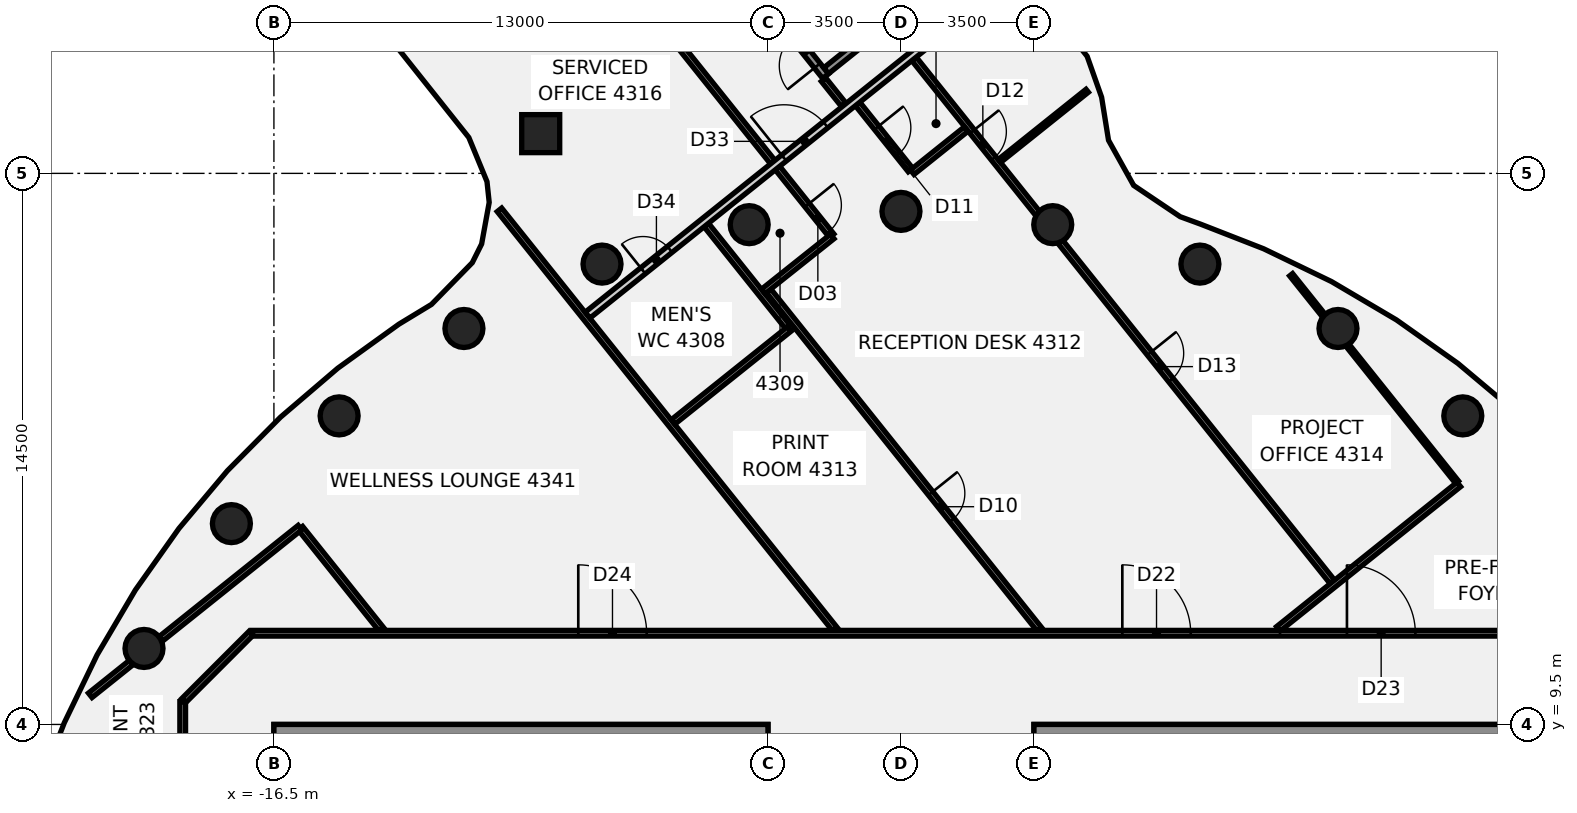
"""IFC4 building model, lengths in metres.
Left out: names, types, materials, properties, quantities, classifications, styles, units other than length and angle.
Written with IfcOpenShell. Run it as: python <this file> out.ifc"""

import sys

from ifc_helpers import new_model, si_unit, direction, frame, frame_2d, origin, origin_2d, place, context, subcontext, project, spatial, rectangle, circle, extrude, element, fill, save


model = new_model("IFC4")
c1 = context("Model", 3, precision=1e-05, world=origin(), true_north=direction((0.0, 1.0)))
c2 = subcontext(c1, "Body", "Model", "MODEL_VIEW")
j1 = project(units=[si_unit("LENGTHUNIT", "METRE"), si_unit("PLANEANGLEUNIT", "RADIAN")], contexts=[c1])
p1 = place(None, origin())
s1 = spatial("IfcSite", under=j1, at=p1, CompositionType="ELEMENT")
p2 = place(p1, origin())
s2 = spatial("IfcBuilding", under=s1, at=p2, CompositionType="ELEMENT")
p3 = place(p2, frame((0.0, 0.0, 174.25)))
s3 = spatial("IfcBuildingStorey", under=s2, at=p3, CompositionType="ELEMENT", Elevation=174.25)
for number, where, z_axis, x_axis in (
    (1, (14.784, 17.619, -0.14), (0.0, 0.0, 1.0), (1.0, 0.0, 0.0)),
    (2, (11.5, 19.919, -0.14), (0.0, 0.0, 1.0), (1.0, 0.0, 0.0)),
    (3, (7.866, 21.613, -0.14), (0.0, 0.0, 1.0), (1.0, 0.0, 0.0)),
    (4, (3.994, 22.651, -0.14), (0.0, 0.0, 1.0), (1.0, 0.0, 0.0)),
    (5, (0.0, 23.0, -0.14), (0.0, 0.0, 1.0), (1.0, 0.0, 0.0)),
    (6, (-3.994, 22.651, -0.14), (0.0, 0.0, 1.0), (1.0, 0.0, 0.0)),
    (7, (-7.866, 21.613, -0.14), (0.0, 0.0, 1.0), (1.0, 0.0, 0.0)),
    (8, (-11.5, 19.919, -0.14), (0.0, 0.0, 1.0), (1.0, 0.0, 0.0)),
    (9, (-14.784, 17.619, -0.14), (0.0, 0.0, 1.0), (1.0, 0.0, 0.0)),
    (10, (-17.619, 14.784, -0.14), (0.0, 0.0, 1.0), (1.0, 0.0, 0.0)),
    (11, (-19.919, 11.5, -0.14), (0.0, 0.0, 1.0), (1.0, 0.0, 0.0)),
):
    element("IfcColumn", number, at=place(p3, frame(where, z_axis=z_axis, x_axis=x_axis)), inside=s3, PredefinedType="COLUMN", context=c2, shape_type="SweptSolid", body=[
        extrude(circle(Radius=0.5, at=origin_2d()), origin(), (0.0, 0.0, 1.0), 3.71),
    ])
p4 = place(p3, frame((-9.48, 25.046, -0.139), z_axis=(-0.014481164996, -0.046668845375, 0.998805443884), x_axis=(0.780047471785, 0.624409257926, 0.040484816638)))
e12 = element("IfcColumn", 12, at=p4, inside=s3, PredefinedType="COLUMN", context=c2, shape_type="SweptSolid", body=[
    extrude(rectangle(XDim=1.0, YDim=1.0, at=origin_2d()), origin(), (0.0, 0.0, 1.0), 3.709),
])
p5 = place(p3, frame((-15.802, 14.664, 0.0), z_axis=(0.0, 0.0, 1.0), x_axis=(0.624703791161, -0.780861814477, 0.0)))
e13 = element("IfcWall", 13, at=p5, inside=s3, PredefinedType="PARTITIONING", context=c2, shape_type="SweptSolid", body=[
    extrude(rectangle(XDim=3.405, YDim=0.15, at=frame_2d((1.703, 0.0))), origin(), (0.0, 0.0, 1.0), 2.97),
])
p6 = place(p3, frame((-14.505, 38.211, 0.0), z_axis=(0.0, 0.0, 1.0), x_axis=(0.624664246516, -0.780893449278, 0.0)))
e14 = element("IfcWall", 14, at=p6, inside=s3, PredefinedType="PARTITIONING", context=c2, shape_type="SweptSolid", body=[
    extrude(rectangle(XDim=20.3, YDim=0.15, at=frame_2d((10.15, 0.0))), origin(), (0.0, 0.0, 1.0), 2.87),
])
p7 = place(p6, frame((19.27, 0.0, 0.0)))
e15 = element("IfcOpeningElement", 15, at=p7, cuts=e14, PredefinedType="OPENING", context=c2, shape_type="SweptSolid", body=[
    extrude(rectangle(XDim=0.9, YDim=2.1, at=frame_2d((0.45, 1.05))), frame((0.0, 0.085, 0.0), z_axis=(0.0, -1.0, 0.0), x_axis=(1.0, 0.0, 0.0)), (0.0, 0.0, 1.0), 0.17),
])
p8 = place(p6, frame((8.77, 0.0, 0.0)))
e16 = element("IfcOpeningElement", 16, at=p8, cuts=e14, PredefinedType="OPENING", context=c2, shape_type="SweptSolid", body=[
    extrude(rectangle(XDim=0.9, YDim=2.1, at=frame_2d((0.45, 1.05))), frame((0.0, 0.085, 0.0), z_axis=(0.0, -1.0, 0.0), x_axis=(1.0, 0.0, 0.0)), (0.0, 0.0, 1.0), 0.17),
])
p9 = place(p6, frame((2.32, 0.0, 0.0)))
e17 = element("IfcOpeningElement", 17, at=p9, cuts=e14, PredefinedType="OPENING", context=c2, shape_type="SweptSolid", body=[
    extrude(rectangle(XDim=0.9, YDim=2.1, at=frame_2d((0.45, 1.05))), frame((0.0, 0.085, 0.0), z_axis=(0.0, -1.0, 0.0), x_axis=(1.0, 0.0, 0.0)), (0.0, 0.0, 1.0), 0.17),
])
p10 = place(p3, frame((-2.037, 26.467, 0.0), z_axis=(0.0, 0.0, 1.0), x_axis=(0.624730499049, -0.780840446927, 0.0)))
e18 = element("IfcWall", 18, at=p10, inside=s3, PredefinedType="PARTITIONING", context=c2, shape_type="SweptSolid", body=[
    extrude(rectangle(XDim=0.84, YDim=0.15, at=frame_2d((0.42, 0.0))), origin(), (0.0, 0.0, 1.0), 2.87),
])
p11 = place(p3, frame((-10.565, 23.041, 0.0), z_axis=(0.0, 0.0, 1.0), x_axis=(0.624676086113, -0.780883978218, 0.0)))
e19 = element("IfcWall", 19, at=p11, inside=s3, PredefinedType="PARTITIONING", context=c2, shape_type="SweptSolid", body=[
    extrude(rectangle(XDim=14.132, YDim=0.15, at=frame_2d((7.066, 0.0))), origin(), (0.0, 0.0, 1.0), 2.97),
])
p12 = place(p3, frame((-5.123, 22.641, 0.0), z_axis=(0.0, 0.0, 1.0), x_axis=(0.624590747683, -0.780952237918, 0.0)))
e20 = element("IfcWall", 20, at=p12, inside=s3, PredefinedType="PARTITIONING", context=c2, shape_type="SweptSolid", body=[
    extrude(rectangle(XDim=3.426, YDim=0.15, at=frame_2d((1.713, 0.0))), origin(), (0.0, 0.0, 1.0), 2.87),
])
p13 = place(p3, frame((-3.479, 20.906, 0.0), z_axis=(0.0, 0.0, 1.0), x_axis=(0.624627130609, -0.780923138155, 0.0)))
e21 = element("IfcWall", 21, at=p13, inside=s3, PredefinedType="PARTITIONING", context=c2, shape_type="SweptSolid", body=[
    extrude(rectangle(XDim=11.398, YDim=0.15, at=frame_2d((5.699, 0.0))), origin(), (0.0, 0.0, 1.0), 2.97),
])
p14 = place(p13, frame((6.82, 0.0, 0.0)))
e22 = element("IfcOpeningElement", 22, at=p14, cuts=e21, PredefinedType="OPENING", context=c2, shape_type="SweptSolid", body=[
    extrude(rectangle(XDim=0.9, YDim=2.1, at=frame_2d((0.45, 1.05))), frame((0.0, 0.085, 0.0), z_axis=(0.0, -1.0, 0.0), x_axis=(1.0, 0.0, 0.0)), (0.0, 0.0, 1.0), 0.17),
])
p15 = place(p3, frame((-1.139, 25.826, 0.0), z_axis=(0.0, 0.0, 1.0), x_axis=(0.624641514256, -0.780911633072, 0.0)))
e23 = element("IfcWall", 23, at=p15, inside=s3, PredefinedType="PARTITIONING", context=c2, shape_type="SweptSolid", body=[
    extrude(rectangle(XDim=2.225, YDim=0.15, at=frame_2d((1.112, 0.0))), origin(), (0.0, 0.0, 1.0), 2.97),
])
p16 = place(p15, frame((0.8, 0.0, 0.0)))
e24 = element("IfcOpeningElement", 24, at=p16, cuts=e23, PredefinedType="OPENING", context=c2, shape_type="SweptSolid", body=[
    extrude(rectangle(XDim=0.9, YDim=2.1, at=frame_2d((0.45, 1.05))), frame((0.0, 0.085, 0.0), z_axis=(0.0, -1.0, 0.0), x_axis=(1.0, 0.0, 0.0)), (0.0, 0.0, 1.0), 0.17),
])
p17 = place(p3, frame((0.344, 27.013, 0.0), z_axis=(0.0, 0.0, 1.0), x_axis=(0.624651442113, -0.7809036918, 0.0)))
e25 = element("IfcWall", 25, at=p17, inside=s3, PredefinedType="PARTITIONING", context=c2, shape_type="SweptSolid", body=[
    extrude(rectangle(XDim=5.462, YDim=0.15, at=frame_2d((2.731, 0.0))), origin(), (0.0, 0.0, 1.0), 2.97),
])
p18 = place(p17, frame((2.45, 0.0, 0.0)))
e26 = element("IfcOpeningElement", 26, at=p18, cuts=e25, PredefinedType="OPENING", context=c2, shape_type="SweptSolid", body=[
    extrude(rectangle(XDim=0.9, YDim=2.1, at=frame_2d((0.45, 1.05))), frame((0.0, 0.085, 0.0), z_axis=(0.0, -1.0, 0.0), x_axis=(1.0, 0.0, 0.0)), (0.0, 0.0, 1.0), 0.17),
])
p19 = place(p3, frame((4.037, 22.396, 0.0), z_axis=(0.0, 0.0, 1.0), x_axis=(0.624628926241, -0.780921701903, 0.0)))
e27 = element("IfcWall", 27, at=p19, inside=s3, PredefinedType="PARTITIONING", context=c2, shape_type="SweptSolid", body=[
    extrude(rectangle(XDim=11.708, YDim=0.15, at=frame_2d((5.854, 0.0))), origin(), (0.0, 0.0, 1.0), 2.97),
])
p20 = place(p19, frame((4.007, 0.0, 0.0)))
e28 = element("IfcOpeningElement", 28, at=p20, cuts=e27, PredefinedType="OPENING", context=c2, shape_type="SweptSolid", body=[
    extrude(rectangle(XDim=0.9, YDim=2.1, at=frame_2d((0.45, 1.05))), frame((0.0, 0.085, 0.0), z_axis=(0.0, -1.0, 0.0), x_axis=(1.0, 0.0, 0.0)), (0.0, 0.0, 1.0), 0.17),
])
p21 = place(p3, frame((10.266, 21.333, 0.0), z_axis=(0.0, 0.0, 1.0), x_axis=(0.62463072699, -0.780920261551, 0.0)))
e29 = element("IfcWall", 29, at=p21, inside=s3, PredefinedType="PARTITIONING", context=c2, shape_type="SweptSolid", body=[
    extrude(rectangle(XDim=1.389, YDim=0.1, at=frame_2d((0.694, 0.0))), origin(), (0.0, 0.0, 1.0), 2.97),
])
p22 = place(p3, frame((11.752, 19.476, 0.0), z_axis=(0.0, 0.0, 1.0), x_axis=(0.624636960835, -0.780915275276, 0.0)))
e30 = element("IfcWall", 30, at=p22, inside=s3, PredefinedType="PARTITIONING", context=c2, shape_type="SweptSolid", body=[
    extrude(rectangle(XDim=4.613, YDim=0.1, at=frame_2d((2.307, 0.0))), origin(), (0.0, 0.0, 1.0), 2.97),
])
p23 = place(p3, frame((-17.065, 11.9, 0.0), z_axis=(0.0, 0.0, 1.0), x_axis=(1.0, 0.0, 0.0)))
e31 = element("IfcWall", 31, at=p23, inside=s3, PredefinedType="PARTITIONING", context=c2, shape_type="SweptSolid", body=[
    extrude(rectangle(XDim=34.165, YDim=0.15, at=frame_2d((17.083, 0.0))), origin(), (0.0, 0.0, 1.0), 2.97),
])
p24 = place(p23, frame((22.89, 0.0, 0.0)))
e32 = element("IfcOpeningElement", 32, at=p24, cuts=e31, PredefinedType="OPENING", context=c2, shape_type="SweptSolid", body=[
    extrude(rectangle(XDim=1.8, YDim=2.1, at=frame_2d((0.9, 1.05))), frame((0.0, 0.085, 0.0), z_axis=(0.0, -1.0, 0.0), x_axis=(1.0, 0.0, 0.0)), (0.0, 0.0, 1.0), 0.17),
])
p25 = place(p23, frame((28.801, 0.0, 0.0)))
e33 = element("IfcOpeningElement", 33, at=p25, cuts=e31, PredefinedType="OPENING", context=c2, shape_type="SweptSolid", body=[
    extrude(rectangle(XDim=1.8, YDim=2.1, at=frame_2d((0.9, 1.05))), frame((0.0, 0.085, 0.0), z_axis=(0.0, -1.0, 0.0), x_axis=(1.0, 0.0, 0.0)), (0.0, 0.0, 1.0), 0.17),
])
p26 = place(p23, frame((8.574, 0.0, 0.0)))
e34 = element("IfcOpeningElement", 34, at=p26, cuts=e31, PredefinedType="OPENING", context=c2, shape_type="SweptSolid", body=[
    extrude(rectangle(XDim=1.8, YDim=2.1, at=frame_2d((0.9, 1.05))), frame((0.0, 0.085, 0.0), z_axis=(0.0, -1.0, 0.0), x_axis=(1.0, 0.0, 0.0)), (0.0, 0.0, 1.0), 0.17),
])
p27 = place(p3, frame((-21.333, 10.266, 0.0), z_axis=(0.0, 0.0, 1.0), x_axis=(0.780920261551, 0.62463072699, 0.0)))
e35 = element("IfcWall", 35, at=p27, inside=s3, PredefinedType="PARTITIONING", context=c2, shape_type="SweptSolid", body=[
    extrude(rectangle(XDim=1.389, YDim=0.15, at=frame_2d((0.694, 0.0))), origin(), (0.0, 0.0, 1.0), 2.97),
])
p28 = place(p3, frame((-19.476, 11.752, 0.0), z_axis=(0.0, 0.0, 1.0), x_axis=(0.780939933327, 0.624606132323, 0.0)))
e36 = element("IfcWall", 36, at=p28, inside=s3, PredefinedType="PARTITIONING", context=c2, shape_type="SweptSolid", body=[
    extrude(rectangle(XDim=4.688, YDim=0.15, at=frame_2d((2.344, 0.0))), origin(), (0.0, 0.0, 1.0), 2.97),
])
p29 = place(p3, frame((-8.247, 20.27, 0.0), z_axis=(0.0, 0.0, 1.0), x_axis=(0.780898959687, 0.624657357885, 0.0)))
e37 = element("IfcWall", 37, at=p29, inside=s3, PredefinedType="PARTITIONING", context=c2, shape_type="SweptSolid", body=[
    extrude(rectangle(XDim=14.219, YDim=0.2, at=frame_2d((7.11, 0.0))), origin(), (0.0, 0.0, 1.0), 2.87),
])
p30 = place(p29, frame((6.62, 0.0, 0.0)))
e38 = element("IfcOpeningElement", 38, at=p30, cuts=e37, PredefinedType="OPENING", context=c2, shape_type="SweptSolid", body=[
    extrude(rectangle(XDim=1.4, YDim=2.1, at=frame_2d((0.7, 1.05))), frame((0.0, 0.11, 0.0), z_axis=(0.0, -1.0, 0.0), x_axis=(1.0, 0.0, 0.0)), (0.0, 0.0, 1.0), 0.22),
])
p31 = place(p29, frame((1.87, 0.0, 0.0)))
e39 = element("IfcOpeningElement", 39, at=p31, cuts=e37, PredefinedType="OPENING", context=c2, shape_type="SweptSolid", body=[
    extrude(rectangle(XDim=0.9, YDim=2.1, at=frame_2d((0.45, 1.05))), frame((0.0, 0.11, 0.0), z_axis=(0.0, -1.0, 0.0), x_axis=(1.0, 0.0, 0.0)), (0.0, 0.0, 1.0), 0.22),
])
p32 = place(p3, frame((-5.998, 17.459, 0.0), z_axis=(0.0, 0.0, 1.0), x_axis=(0.781020694531, 0.624505143865, 0.0)))
e40 = element("IfcWall", 40, at=p32, inside=s3, PredefinedType="PARTITIONING", context=c2, shape_type="SweptSolid", body=[
    extrude(rectangle(XDim=3.92, YDim=0.15, at=frame_2d((1.96, 0.0))), origin(), (0.0, 0.0, 1.0), 2.97),
])
p33 = place(p3, frame((2.59, 24.325, 0.0), z_axis=(0.0, 0.0, 1.0), x_axis=(0.781045836703, 0.624473699181, 0.0)))
e41 = element("IfcWall", 41, at=p33, inside=s3, PredefinedType="PARTITIONING", context=c2, shape_type="SweptSolid", body=[
    extrude(rectangle(XDim=2.959, YDim=0.1, at=frame_2d((1.48, 0.0))), origin(), (0.0, 0.0, 1.0), 2.97),
])
p34 = place(p3, frame((-3.623, 20.894, 0.0), z_axis=(0.0, 0.0, 1.0), x_axis=(0.782303881758, 0.622896971084, 0.0)))
e42 = element("IfcWall", 42, at=p34, inside=s3, PredefinedType="PARTITIONING", context=c2, shape_type="SweptSolid", body=[
    extrude(rectangle(XDim=2.32, YDim=0.15, at=frame_2d((1.16, 0.0))), origin(), (0.0, 0.0, 1.0), 2.87),
])
p35 = place(p3, frame((0.297, 24.03, 0.0), z_axis=(0.0, 0.0, 1.0), x_axis=(0.780698592374, 0.624907759485, 0.0)))
e43 = element("IfcWall", 43, at=p35, inside=s3, PredefinedType="PARTITIONING", context=c2, shape_type="SweptSolid", body=[
    extrude(rectangle(XDim=1.819, YDim=0.15, at=frame_2d((0.91, 0.0))), origin(), (0.0, 0.0, 1.0), 2.97),
])
p36 = place(p3, frame((9.93, 12.016, 0.0), z_axis=(0.0, 0.0, 1.0), x_axis=(0.780892305739, 0.624665676052, 0.0)))
e44 = element("IfcWall", 44, at=p36, inside=s3, PredefinedType="PARTITIONING", context=c2, shape_type="SweptSolid", body=[
    extrude(rectangle(XDim=6.082, YDim=0.15, at=frame_2d((3.041, 0.0))), origin(), (0.0, 0.0, 1.0), 2.97),
])
p37 = place(p3, frame((-18.872, 10.128, 0.0), z_axis=(0.0, 0.0, 1.0), x_axis=(0.707106781187, 0.707106781187, 0.0)))
e45 = element("IfcWall", 45, at=p37, inside=s3, PredefinedType="PARTITIONING", context=c2, shape_type="SweptSolid", body=[
    extrude(rectangle(XDim=2.505, YDim=0.15, at=frame_2d((1.253, 0.0))), origin(), (0.0, 0.0, 1.0), 2.97),
])
p38 = place(p3, frame((-18.9, -10.1, 0.0), z_axis=(0.0, 0.0, 1.0), x_axis=(0.0, 1.0, 0.0)))
e46 = element("IfcWall", 46, at=p38, inside=s3, PredefinedType="PARTITIONING", context=c2, shape_type="SweptSolid", body=[
    extrude(rectangle(XDim=20.2, YDim=0.15, at=frame_2d((10.1, 0.0))), origin(), (0.0, 0.0, 1.0), 2.97),
])
p39 = place(p38, frame((12.726, 0.0, 0.0)))
e47 = element("IfcOpeningElement", 47, at=p39, cuts=e46, PredefinedType="OPENING", context=c2, shape_type="SweptSolid", body=[
    extrude(rectangle(XDim=1.8, YDim=2.1, at=frame_2d((0.9, 1.05))), frame((0.0, 0.085, 0.0), z_axis=(0.0, -1.0, 0.0), x_axis=(1.0, 0.0, 0.0)), (0.0, 0.0, 1.0), 0.17),
])
p40 = place(p38, frame((4.047, 0.0, 0.0)))
e48 = element("IfcOpeningElement", 48, at=p40, cuts=e46, PredefinedType="OPENING", context=c2, shape_type="SweptSolid", body=[
    extrude(rectangle(XDim=1.8, YDim=2.1, at=frame_2d((0.9, 1.05))), frame((0.0, 0.085, 0.0), z_axis=(0.0, -1.0, 0.0), x_axis=(1.0, 0.0, 0.0)), (0.0, 0.0, 1.0), 0.17),
])
for number, where, z_axis, x_axis in (
    (49, (-16.5, 9.2, 0.0), (0.0, 0.0, 1.0), (1.0, 0.0, 0.0)),
    (50, (16.5, 9.2, 0.0), (0.0, 0.0, 1.0), (-1.0, 0.0, 0.0)),
):
    element("IfcWall", number, at=place(p3, frame(where, z_axis=z_axis, x_axis=x_axis)), inside=s3, PredefinedType="SHEAR", context=c2, shape_type="SweptSolid", body=[
        extrude(rectangle(XDim=13.0, YDim=0.6, at=frame_2d((6.5, 0.0))), origin(), (0.0, 0.0, 1.0), 3.57),
    ])
p41 = place(p3, frame((-1.983, 26.56, -0.14), z_axis=(0.0, 0.0, 1.0), x_axis=(-0.624672828433, 0.780886584222, 0.0)))
e51 = element("IfcWall", 51, at=p41, inside=s3, PredefinedType="SHEAR", context=c2, shape_type="SweptSolid", body=[
    extrude(rectangle(XDim=6.7, YDim=0.2, at=frame_2d((3.35, 0.0))), origin(), (0.0, 0.0, 1.0), 3.01),
])
p42 = place(p41, frame((0.35, 0.0, 0.0)))
e52 = element("IfcOpeningElement", 52, at=p42, cuts=e51, PredefinedType="OPENING", context=c2, shape_type="SweptSolid", body=[
    extrude(rectangle(XDim=1.0, YDim=2.1, at=frame_2d((0.5, 1.05))), frame((0.0, 0.11, 0.0), z_axis=(0.0, -1.0, 0.0), x_axis=(1.0, 0.0, 0.0)), (0.0, 0.0, 1.0), 0.22),
])
p43 = place(p3, frame((0.531, 28.7, -0.14), z_axis=(0.0, 0.0, 1.0), x_axis=(-0.780906026403, -0.624648523514, 0.0)))
e53 = element("IfcWall", 53, at=p43, inside=s3, PredefinedType="SHEAR", context=c2, shape_type="SweptSolid", body=[
    extrude(rectangle(XDim=3.2, YDim=0.2, at=frame_2d((1.6, 0.0))), origin(), (0.0, 0.0, 1.0), 3.01),
])
p44 = place(p7, frame((0.9, 0.0, 0.0), z_axis=(0.0, 0.0, 1.0), x_axis=(-1.0, 0.0, 0.0)))
e54 = element("IfcDoor", 54, at=p44, inside=s3, OperationType="SINGLE_SWING_RIGHT", PredefinedType="DOOR", context=c2, shape_type="SweptSolid", body=[
    extrude(rectangle(XDim=0.9, YDim=2.1, at=frame_2d((0.45, 1.05))), frame((0.0, 0.025, 0.0), z_axis=(0.0, -1.0, 0.0), x_axis=(1.0, 0.0, 0.0)), (0.0, 0.0, 1.0), 0.05),
])
fill(e15, e54)
p45 = place(p14, frame((0.9, 0.0, 0.0), z_axis=(0.0, 0.0, 1.0), x_axis=(-1.0, 0.0, 0.0)))
e55 = element("IfcDoor", 55, at=p45, inside=s3, OperationType="SINGLE_SWING_RIGHT", PredefinedType="DOOR", context=c2, shape_type="SweptSolid", body=[
    extrude(rectangle(XDim=0.9, YDim=2.1, at=frame_2d((0.45, 1.05))), frame((0.0, 0.025, 0.0), z_axis=(0.0, -1.0, 0.0), x_axis=(1.0, 0.0, 0.0)), (0.0, 0.0, 1.0), 0.05),
])
fill(e22, e55)
p46 = place(p16, origin())
e56 = element("IfcDoor", 56, at=p46, inside=s3, OperationType="SINGLE_SWING_LEFT", PredefinedType="DOOR", context=c2, shape_type="SweptSolid", body=[
    extrude(rectangle(XDim=0.9, YDim=2.1, at=frame_2d((0.45, 1.05))), frame((0.0, 0.025, 0.0), z_axis=(0.0, -1.0, 0.0), x_axis=(1.0, 0.0, 0.0)), (0.0, 0.0, 1.0), 0.05),
])
fill(e24, e56)
p47 = place(p18, origin())
e57 = element("IfcDoor", 57, at=p47, inside=s3, OperationType="SINGLE_SWING_LEFT", PredefinedType="DOOR", context=c2, shape_type="SweptSolid", body=[
    extrude(rectangle(XDim=0.9, YDim=2.1, at=frame_2d((0.45, 1.05))), frame((0.0, 0.025, 0.0), z_axis=(0.0, -1.0, 0.0), x_axis=(1.0, 0.0, 0.0)), (0.0, 0.0, 1.0), 0.05),
])
fill(e26, e57)
p48 = place(p20, origin())
e58 = element("IfcDoor", 58, at=p48, inside=s3, OperationType="SINGLE_SWING_RIGHT", PredefinedType="DOOR", context=c2, shape_type="SweptSolid", body=[
    extrude(rectangle(XDim=0.9, YDim=2.1, at=frame_2d((0.45, 1.05))), frame((0.0, 0.025, 0.0), z_axis=(0.0, -1.0, 0.0), x_axis=(1.0, 0.0, 0.0)), (0.0, 0.0, 1.0), 0.05),
])
fill(e28, e58)
p49 = place(p24, frame((1.8, 0.0, 0.0), z_axis=(0.0, 0.0, 1.0), x_axis=(-1.0, 0.0, 0.0)))
e59 = element("IfcDoor", 59, at=p49, inside=s3, OperationType="DOUBLE_DOOR_SINGLE_SWING", PredefinedType="DOOR", context=c2, shape_type="SweptSolid", body=[
    extrude(rectangle(XDim=1.8, YDim=2.1, at=frame_2d((0.9, 1.05))), frame((0.0, 0.025, 0.0), z_axis=(0.0, -1.0, 0.0), x_axis=(1.0, 0.0, 0.0)), (0.0, 0.0, 1.0), 0.05),
])
fill(e32, e59)
p50 = place(p25, origin())
e60 = element("IfcDoor", 60, at=p50, inside=s3, OperationType="DOUBLE_DOOR_SINGLE_SWING", PredefinedType="DOOR", context=c2, shape_type="SweptSolid", body=[
    extrude(rectangle(XDim=1.8, YDim=2.1, at=frame_2d((0.9, 1.05))), frame((0.0, 0.025, 0.0), z_axis=(0.0, -1.0, 0.0), x_axis=(1.0, 0.0, 0.0)), (0.0, 0.0, 1.0), 0.05),
])
fill(e33, e60)
p51 = place(p26, origin())
e61 = element("IfcDoor", 61, at=p51, inside=s3, OperationType="DOUBLE_DOOR_SINGLE_SWING", PredefinedType="DOOR", context=c2, shape_type="SweptSolid", body=[
    extrude(rectangle(XDim=1.8, YDim=2.1, at=frame_2d((0.9, 1.05))), frame((0.0, 0.025, 0.0), z_axis=(0.0, -1.0, 0.0), x_axis=(1.0, 0.0, 0.0)), (0.0, 0.0, 1.0), 0.05),
])
fill(e34, e61)
p52 = place(p30, frame((1.4, 0.0, 0.0), z_axis=(0.0, 0.0, 1.0), x_axis=(-1.0, 0.0, 0.0)))
e62 = element("IfcDoor", 62, at=p52, inside=s3, OperationType="DOUBLE_DOOR_SINGLE_SWING", PredefinedType="DOOR", context=c2, shape_type="SweptSolid", body=[
    extrude(rectangle(XDim=1.4, YDim=2.1, at=frame_2d((0.7, 1.05))), frame((0.0, 0.025, 0.0), z_axis=(0.0, -1.0, 0.0), x_axis=(1.0, 0.0, 0.0)), (0.0, 0.0, 1.0), 0.05),
])
fill(e38, e62)
p53 = place(p31, frame((0.9, 0.0, 0.0), z_axis=(0.0, 0.0, 1.0), x_axis=(-1.0, 0.0, 0.0)))
e63 = element("IfcDoor", 63, at=p53, inside=s3, OperationType="SINGLE_SWING_LEFT", PredefinedType="DOOR", context=c2, shape_type="SweptSolid", body=[
    extrude(rectangle(XDim=0.9, YDim=2.1, at=frame_2d((0.45, 1.05))), frame((0.0, 0.025, 0.0), z_axis=(0.0, -1.0, 0.0), x_axis=(1.0, 0.0, 0.0)), (0.0, 0.0, 1.0), 0.05),
])
fill(e39, e63)
p54 = place(p42, origin())
e64 = element("IfcDoor", 64, at=p54, inside=s3, OperationType="SINGLE_SWING_LEFT", PredefinedType="DOOR", context=c2, shape_type="SweptSolid", body=[
    extrude(rectangle(XDim=1.0, YDim=2.1, at=frame_2d((0.5, 1.05))), frame((0.0, 0.025, 0.0), z_axis=(0.0, -1.0, 0.0), x_axis=(1.0, 0.0, 0.0)), (0.0, 0.0, 1.0), 0.05),
])
fill(e52, e64)
save(model, sys.argv[1])
